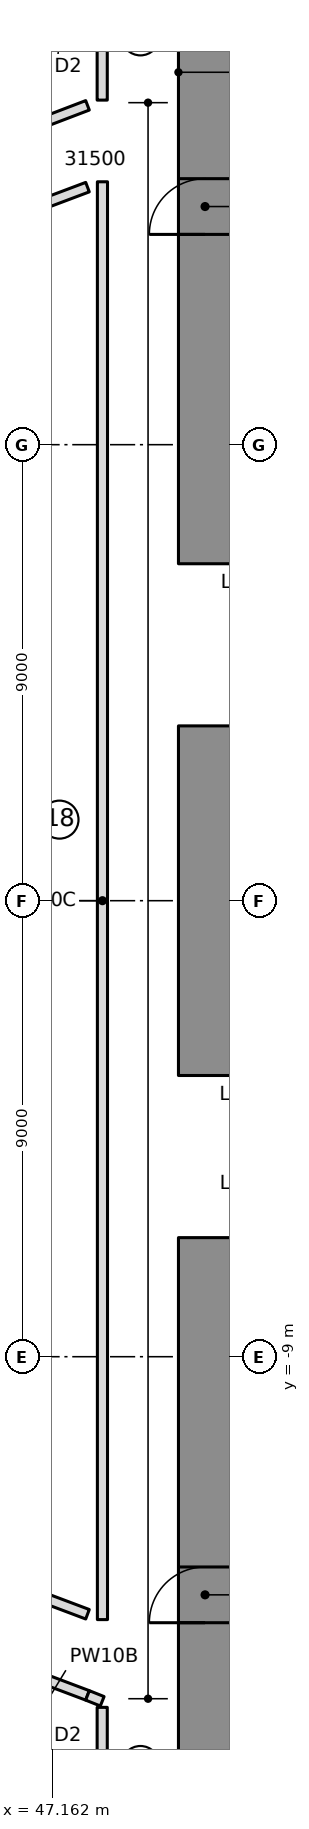
"""IFC4 building model, lengths in metres.
Left out: names, types, materials, properties, quantities, classifications, styles, units other than length and angle.
Written with IfcOpenShell. Run it as: python <this file> out.ifc"""

import sys

from ifc_helpers import new_model, si_unit, direction, frame, frame_2d, origin, place, context, subcontext, project, spatial, rectangle, extrude, element, fill, save


model = new_model("IFC4")
c1 = context("Model", 3, precision=1e-05, world=origin(), true_north=direction((0.0, 1.0)))
c2 = subcontext(c1, "Body", "Model", "MODEL_VIEW")
j1 = project(units=[si_unit("LENGTHUNIT", "METRE"), si_unit("PLANEANGLEUNIT", "RADIAN")], contexts=[c1])
p1 = place(None, origin())
s1 = spatial("IfcSite", under=j1, at=p1, CompositionType="ELEMENT")
p2 = place(p1, origin())
s2 = spatial("IfcBuilding", under=s1, at=p2, CompositionType="ELEMENT")
p3 = place(p2, frame((0.0, 0.0, 109.75)))
s3 = spatial("IfcBuildingStorey", under=s2, at=p3, CompositionType="ELEMENT", Elevation=109.75)
p4 = place(p3, frame((50.175, 6.65, 0.0), z_axis=(0.0, 0.0, 1.0), x_axis=(0.0, 1.0, 0.0)))
e1 = element("IfcWall", 1, at=p4, inside=s3, PredefinedType="SHEAR", context=c2, shape_type="SweptSolid", body=[
    extrude(rectangle(XDim=10.15, YDim=1.05, at=frame_2d((5.075, 0.0))), origin(), (0.0, 0.0, 1.0), 3.55),
])
p5 = place(p4, frame((6.5, 0.0, 0.0)))
e2 = element("IfcOpeningElement", 2, at=p5, cuts=e1, PredefinedType="OPENING", context=c2, shape_type="SweptSolid", body=[
    extrude(rectangle(XDim=1.1, YDim=2.1, at=frame_2d((0.55, 1.05))), frame((0.0, 0.535, 0.0), z_axis=(0.0, -1.0, 0.0), x_axis=(1.0, 0.0, 0.0)), (0.0, 0.0, 1.0), 1.07),
])
p6 = place(p3, frame((50.175, -3.45, 0.0), z_axis=(0.0, 0.0, 1.0), x_axis=(0.0, 1.0, 0.0)))
e3 = element("IfcWall", 3, at=p6, inside=s3, PredefinedType="SHEAR", context=c2, shape_type="SweptSolid", body=[
    extrude(rectangle(XDim=6.9, YDim=1.05, at=frame_2d((3.45, 0.0))), origin(), (0.0, 0.0, 1.0), 3.55),
])
p7 = place(p3, frame((50.175, -16.8, 0.0), z_axis=(0.0, 0.0, 1.0), x_axis=(0.0, 1.0, 0.0)))
e4 = element("IfcWall", 4, at=p7, inside=s3, PredefinedType="SHEAR", context=c2, shape_type="SweptSolid", body=[
    extrude(rectangle(XDim=10.15, YDim=1.05, at=frame_2d((5.075, 0.0))), origin(), (0.0, 0.0, 1.0), 3.55),
])
p8 = place(p7, frame((2.55, 0.0, 0.0)))
e5 = element("IfcOpeningElement", 5, at=p8, cuts=e4, PredefinedType="OPENING", context=c2, shape_type="SweptSolid", body=[
    extrude(rectangle(XDim=1.1, YDim=2.1, at=frame_2d((0.55, 1.05))), frame((0.0, 0.535, 0.0), z_axis=(0.0, -1.0, 0.0), x_axis=(1.0, 0.0, 0.0)), (0.0, 0.0, 1.0), 1.07),
])
p9 = place(p3, frame((46.169, 17.509, 0.0), z_axis=(0.0, 0.0, 1.0), x_axis=(0.417409478396, -0.90871850831, 0.0)))
e6 = element("IfcWall", 6, at=p9, inside=s3, PredefinedType="PARTITIONING", context=c2, shape_type="SweptSolid", body=[
    extrude(rectangle(XDim=2.283, YDim=0.1, at=frame_2d((1.142, 0.0))), origin(), (0.0, 0.0, 1.0), 3.25),
])
p10 = place(p9, frame((0.75, 0.0, 0.0)))
e7 = element("IfcOpeningElement", 7, at=p10, cuts=e6, PredefinedType="OPENING", context=c2, shape_type="SweptSolid", body=[
    extrude(rectangle(XDim=0.8, YDim=2.1, at=frame_2d((0.4, 1.05))), frame((0.0, 0.06, 0.0), z_axis=(0.0, -1.0, 0.0), x_axis=(1.0, 0.0, 0.0)), (0.0, 0.0, 1.0), 0.12),
])
p11 = place(p3, frame((47.122, -15.434, 0.0), z_axis=(0.0, 0.0, 1.0), x_axis=(-0.417409478396, -0.90871850831, 0.0)))
e8 = element("IfcWall", 8, at=p11, inside=s3, PredefinedType="PARTITIONING", context=c2, shape_type="SweptSolid", body=[
    extrude(rectangle(XDim=2.283, YDim=0.1, at=frame_2d((1.142, 0.0))), origin(), (0.0, 0.0, 1.0), 3.25),
])
p12 = place(p11, frame((0.75, 0.0, 0.0)))
e9 = element("IfcOpeningElement", 9, at=p12, cuts=e8, PredefinedType="OPENING", context=c2, shape_type="SweptSolid", body=[
    extrude(rectangle(XDim=0.8, YDim=2.1, at=frame_2d((0.4, 1.05))), frame((0.0, 0.06, 0.0), z_axis=(0.0, -1.0, 0.0), x_axis=(1.0, 0.0, 0.0)), (0.0, 0.0, 1.0), 0.12),
])
p13 = place(p3, frame((47.855, 15.698, 0.0), z_axis=(0.0, 0.0, 1.0), x_axis=(-0.934199537442, -0.35675092746, 0.0)))
e10 = element("IfcWall", 10, at=p13, inside=s3, PredefinedType="PARTITIONING", context=c2, shape_type="SweptSolid", body=[
    extrude(rectangle(XDim=2.982, YDim=0.2, at=frame_2d((1.491, 0.0))), origin(), (0.0, 0.0, 1.0), 3.25),
])
p14 = place(p3, frame((45.069, -14.634, 0.0), z_axis=(0.0, 0.0, 1.0), x_axis=(0.93564003724, -0.352955692282, 0.0)))
e11 = element("IfcWall", 11, at=p14, inside=s3, PredefinedType="PARTITIONING", context=c2, shape_type="SweptSolid", body=[
    extrude(rectangle(XDim=2.978, YDim=0.2, at=frame_2d((1.489, 0.0))), origin(), (0.0, 0.0, 1.0), 3.25),
])
for number, where, z_axis, x_axis in (
    (12, (46.696, 13.647, 0.0), (0.0, 0.0, 1.0), (0.936, 0.352, 0.0)),
    (13, (47.855, -14.083, 0.0), (0.0, 0.0, 1.0), (-0.936, 0.352, 0.0)),
):
    element("IfcWall", number, at=place(p3, frame(where, z_axis=z_axis, x_axis=x_axis)), inside=s3, PredefinedType="PARTITIONING", context=c2, shape_type="SweptSolid", body=[
        extrude(rectangle(XDim=1.239, YDim=0.2, at=frame_2d((0.619, 0.0))), origin(), (0.0, 0.0, 1.0), 3.25),
    ])
p15 = place(p3, frame((48.15, 14.189, 0.0), z_axis=(0.0, 0.0, 1.0), x_axis=(0.0, -1.0, 0.0)))
e14 = element("IfcWall", 14, at=p15, inside=s3, PredefinedType="PARTITIONING", context=c2, shape_type="SweptSolid", body=[
    extrude(rectangle(XDim=28.377, YDim=0.2, at=frame_2d((14.189, 0.0))), origin(), (0.0, 0.0, 1.0), 3.25),
])
p16 = place(p3, frame((48.146, 20.532, 0.0), z_axis=(0.0, 0.0, 1.0), x_axis=(-5.1594263e-05, -0.999999998669, 0.0)))
e15 = element("IfcWall", 15, at=p16, inside=s3, PredefinedType="PARTITIONING", context=c2, shape_type="SweptSolid", body=[
    extrude(rectangle(XDim=4.732, YDim=0.2, at=frame_2d((2.366, 0.0))), origin(), (0.0, 0.0, 1.0), 3.25),
])
p17 = place(p16, frame((1.9, 0.0, 0.0)))
e16 = element("IfcOpeningElement", 16, at=p17, cuts=e15, PredefinedType="OPENING", context=c2, shape_type="SweptSolid", body=[
    extrude(rectangle(XDim=1.0, YDim=2.1, at=frame_2d((0.5, 1.05))), frame((0.0, 0.11, 0.0), z_axis=(0.0, -1.0, 0.0), x_axis=(1.0, 0.0, 0.0)), (0.0, 0.0, 1.0), 0.22),
])
p18 = place(p3, frame((47.855, -15.685, 0.0), z_axis=(0.0, 0.0, 1.0), x_axis=(0.928638194287, -0.370986662983, 0.0)))
e17 = element("IfcWall", 17, at=p18, inside=s3, PredefinedType="PARTITIONING", context=c2, shape_type="SweptSolid", body=[
    extrude(rectangle(XDim=0.312, YDim=0.2, at=frame_2d((0.156, 0.0))), origin(), (0.0, 0.0, 1.0), 3.25),
])
p19 = place(p3, frame((48.145, -15.92, 0.0), z_axis=(0.0, 0.0, 1.0), x_axis=(-5.1610239e-05, -0.999999998668, 0.0)))
e18 = element("IfcWall", 18, at=p19, inside=s3, PredefinedType="PARTITIONING", context=c2, shape_type="SweptSolid", body=[
    extrude(rectangle(XDim=4.73, YDim=0.2, at=frame_2d((2.365, 0.0))), origin(), (0.0, 0.0, 1.0), 3.25),
])
p20 = place(p19, frame((1.9, 0.0, 0.0)))
e19 = element("IfcOpeningElement", 19, at=p20, cuts=e18, PredefinedType="OPENING", context=c2, shape_type="SweptSolid", body=[
    extrude(rectangle(XDim=1.0, YDim=2.1, at=frame_2d((0.5, 1.05))), frame((0.0, 0.11, 0.0), z_axis=(0.0, -1.0, 0.0), x_axis=(1.0, 0.0, 0.0)), (0.0, 0.0, 1.0), 0.22),
])
p21 = place(p5, origin())
e20 = element("IfcDoor", 20, at=p21, inside=s3, OperationType="SINGLE_SWING_RIGHT", PredefinedType="DOOR", context=c2, shape_type="SweptSolid", body=[
    extrude(rectangle(XDim=1.1, YDim=2.1, at=frame_2d((0.55, 1.05))), frame((0.0, 0.025, 0.0), z_axis=(0.0, -1.0, 0.0), x_axis=(1.0, 0.0, 0.0)), (0.0, 0.0, 1.0), 0.05),
])
fill(e2, e20)
p22 = place(p8, origin())
e21 = element("IfcDoor", 21, at=p22, inside=s3, OperationType="SINGLE_SWING_RIGHT", PredefinedType="DOOR", context=c2, shape_type="SweptSolid", body=[
    extrude(rectangle(XDim=1.1, YDim=2.1, at=frame_2d((0.55, 1.05))), frame((0.0, 0.025, 0.0), z_axis=(0.0, -1.0, 0.0), x_axis=(1.0, 0.0, 0.0)), (0.0, 0.0, 1.0), 0.05),
])
fill(e5, e21)
save(model, sys.argv[1])
